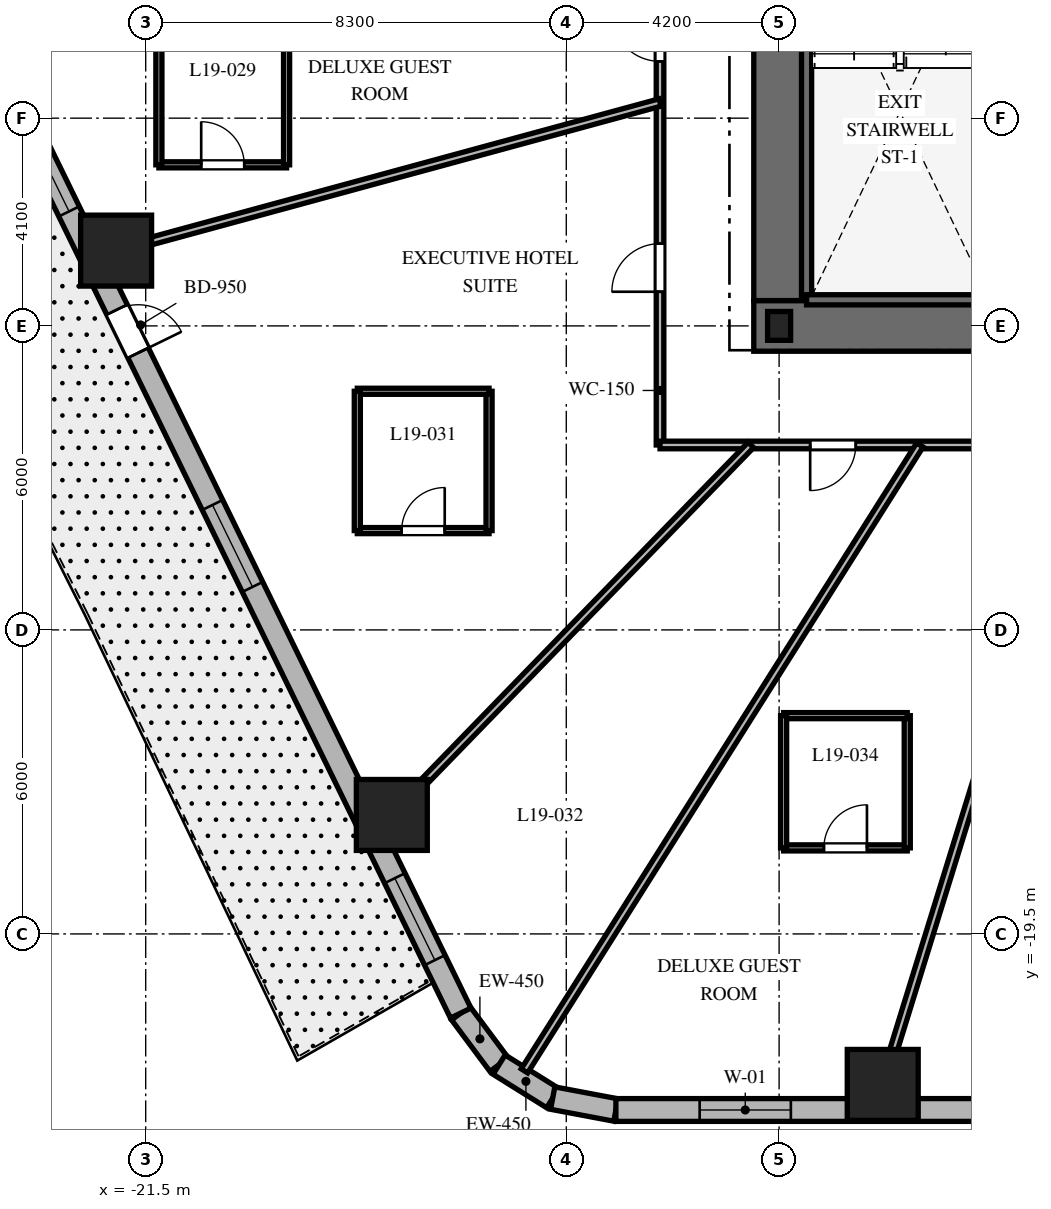
"""IFC4 building model, lengths in metres.
Left out: names, types, materials, properties, quantities, classifications, styles, units other than length and angle.
Written with IfcOpenShell. Run it as: python <this file> out.ifc"""

import sys

from ifc_helpers import new_model, si_unit, direction, frame, frame_2d, origin, origin_2d, place, context, subcontext, project, spatial, rectangle, i_section, extrude, element, fill, save


model = new_model("IFC4")
c1 = context("Model", 3, precision=1e-05, world=origin(), true_north=direction((0.0, 1.0)))
c2 = subcontext(c1, "Body", "Model", "MODEL_VIEW")
j1 = project(units=[si_unit("LENGTHUNIT", "METRE"), si_unit("PLANEANGLEUNIT", "RADIAN")], contexts=[c1])
p1 = place(None, origin())
s1 = spatial("IfcSite", under=j1, at=p1, CompositionType="ELEMENT")
p2 = place(p1, origin())
s2 = spatial("IfcBuilding", under=s1, at=p2, CompositionType="ELEMENT")
p3 = place(p2, frame((0.0, 0.0, 82.3)))
s3 = spatial("IfcBuildingStorey", under=s2, at=p3, CompositionType="ELEMENT", Elevation=82.3)
p4 = place(p3, frame((-9.5, -7.5, 0.0), z_axis=(0.0, 0.0, 1.0), x_axis=(1.0, 0.0, 0.0)))
e1 = element("IfcWall", 1, at=p4, inside=s3, PredefinedType="SHEAR", context=c2, shape_type="SweptSolid", body=[
    extrude(rectangle(XDim=19.0, YDim=1.0, at=frame_2d((9.5, 0.0))), origin(), (0.0, 0.0, 1.0), 3.7),
])
p5 = place(p4, frame((9.55, 0.0, 0.0)))
e2 = element("IfcOpeningElement", 2, at=p5, cuts=e1, PredefinedType="OPENING", context=c2, shape_type="SweptSolid", body=[
    extrude(rectangle(XDim=1.0, YDim=2.15, at=frame_2d((0.5, 1.075))), frame((0.0, 0.51, 0.0), z_axis=(0.0, -1.0, 0.0), x_axis=(1.0, 0.0, 0.0)), (0.0, 0.0, 1.0), 1.02),
])
p6 = place(p3, frame((-9.0, -7.0, 0.0), z_axis=(0.0, 0.0, 1.0), x_axis=(0.0, 1.0, 0.0)))
e3 = element("IfcWall", 3, at=p6, inside=s3, PredefinedType="SHEAR", context=c2, shape_type="SweptSolid", body=[
    extrude(rectangle(XDim=14.0, YDim=1.0, at=frame_2d((7.0, 0.0))), origin(), (0.0, 0.0, 1.0), 3.7),
])
p7 = place(p6, frame((10.125, 0.0, 0.0)))
e4 = element("IfcOpeningElement", 4, at=p7, cuts=e3, PredefinedType="OPENING", context=c2, shape_type="SweptSolid", body=[
    extrude(rectangle(XDim=1.05, YDim=2.15, at=frame_2d((0.525, 1.075))), frame((0.0, 0.51, 0.0), z_axis=(0.0, -1.0, 0.0), x_axis=(1.0, 0.0, 0.0)), (0.0, 0.0, 1.0), 1.02),
])
p8 = place(p3, frame((-8.458, -6.985, 0.0), z_axis=(0.0, 0.0, 1.0), x_axis=(0.0, 1.0, 0.0)))
e5 = element("IfcWall", 5, at=p8, inside=s3, PredefinedType="SHEAR", context=c2, shape_type="SweptSolid", body=[
    extrude(rectangle(XDim=9.143, YDim=0.2, at=frame_2d((4.572, 0.0))), origin(), (0.0, 0.0, 1.0), 3.7),
])
p9 = place(p3, frame((-8.458, -6.985, 0.0), z_axis=(0.0, 0.0, 1.0), x_axis=(1.0, 0.0, 0.0)))
e6 = element("IfcWall", 6, at=p9, inside=s3, PredefinedType="SHEAR", context=c2, shape_type="SweptSolid", body=[
    extrude(rectangle(XDim=3.686, YDim=0.2, at=frame_2d((1.843, 0.0))), origin(), (0.0, 0.0, 1.0), 3.7),
])
p10 = place(p3, frame((-9.0, -7.5, 0.0), z_axis=(0.0, 0.0, 1.0), x_axis=(1.0, 0.0, 0.0)))
e7 = element("IfcColumn", 7, at=p10, inside=s3, PredefinedType="COLUMN", context=c2, shape_type="SweptSolid", body=[
    extrude(i_section(OverallWidth=0.454, OverallDepth=0.569, WebThickness=0.078, FlangeThickness=0.125, at=origin_2d()), origin(), (0.0, 0.0, 1.0), 3.7),
])
for number, where, z_axis, x_axis in (
    (8, (-6.955, -22.48, 0.0), (0.0, 0.0, 1.0), (1.0, 0.0, 0.0)),
    (9, (-22.084, -6.014, 0.0), (0.0, 0.0, 1.0), (1.0, 0.0, 0.0)),
    (10, (-16.643, -17.152, 0.0), (0.0, 0.0, 1.0), (1.0, 0.0, 0.0)),
):
    element("IfcColumn", number, at=place(p3, frame(where, z_axis=z_axis, x_axis=x_axis)), inside=s3, PredefinedType="COLUMN", context=c2, shape_type="SweptSolid", body=[
        extrude(rectangle(XDim=1.4, YDim=1.4, at=origin_2d()), origin(), (0.0, 0.0, 1.0), 3.7),
    ])
p11 = place(p3, frame((-15.284, -21.062, 0.0), z_axis=(0.0, 0.0, 1.0), x_axis=(0.597595366449, -0.801797841104, 0.0)))
e11 = element("IfcWall", 11, at=p11, inside=s3, PredefinedType="SOLIDWALL", context=c2, shape_type="SweptSolid", body=[
    extrude(rectangle(XDim=1.269, YDim=0.45, at=frame_2d((0.634, 0.0))), origin(), (0.0, 0.0, 1.0), 3.38),
])
p12 = place(p3, frame((-14.526, -22.08, 0.0), z_axis=(0.0, 0.0, 1.0), x_axis=(0.848185203596, -0.529699783275, 0.0)))
e12 = element("IfcWall", 12, at=p12, inside=s3, PredefinedType="SOLIDWALL", context=c2, shape_type="SweptSolid", body=[
    extrude(rectangle(XDim=1.247, YDim=0.45, at=frame_2d((0.624, 0.0))), origin(), (0.0, 0.0, 1.0), 3.38),
])
p13 = place(p3, frame((-13.468, -22.74, 0.0), z_axis=(0.0, 0.0, 1.0), x_axis=(0.982717174228, -0.185113358451, 0.0)))
e13 = element("IfcWall", 13, at=p13, inside=s3, PredefinedType="SOLIDWALL", context=c2, shape_type="SweptSolid", body=[
    extrude(rectangle(XDim=1.269, YDim=0.45, at=frame_2d((0.634, 0.0))), origin(), (0.0, 0.0, 1.0), 3.38),
])
p14 = place(p3, frame((-12.221, -22.975, 0.0), z_axis=(0.0, 0.0, 1.0), x_axis=(1.0, 0.0, 0.0)))
e14 = element("IfcWall", 14, at=p14, inside=s3, PredefinedType="SOLIDWALL", context=c2, shape_type="SweptSolid", body=[
    extrude(rectangle(XDim=26.389, YDim=0.45, at=frame_2d((13.195, 0.0))), origin(), (0.0, 0.0, 1.0), 3.38),
])
p15 = place(p14, frame((1.653, 0.0, 0.8)))
e15 = element("IfcOpeningElement", 15, at=p15, cuts=e14, PredefinedType="OPENING", context=c2, shape_type="SweptSolid", body=[
    extrude(rectangle(XDim=1.8, YDim=1.8, at=frame_2d((0.9, 0.9))), frame((0.0, 0.235, 0.0), z_axis=(0.0, -1.0, 0.0), x_axis=(1.0, 0.0, 0.0)), (0.0, 0.0, 1.0), 0.47),
])
p16 = place(p14, frame((12.296, 0.0, 0.8)))
e16 = element("IfcOpeningElement", 16, at=p16, cuts=e14, PredefinedType="OPENING", context=c2, shape_type="SweptSolid", body=[
    extrude(rectangle(XDim=1.8, YDim=1.8, at=frame_2d((0.9, 0.9))), frame((0.0, 0.235, 0.0), z_axis=(0.0, -1.0, 0.0), x_axis=(1.0, 0.0, 0.0)), (0.0, 0.0, 1.0), 0.47),
])
p17 = place(p14, frame((22.938, 0.0, 0.8)))
e17 = element("IfcOpeningElement", 17, at=p17, cuts=e14, PredefinedType="OPENING", context=c2, shape_type="SweptSolid", body=[
    extrude(rectangle(XDim=1.8, YDim=1.8, at=frame_2d((0.9, 0.9))), frame((0.0, 0.235, 0.0), z_axis=(0.0, -1.0, 0.0), x_axis=(1.0, 0.0, 0.0)), (0.0, 0.0, 1.0), 0.47),
])
p18 = place(p3, frame((-24.336, -2.532, 0.0), z_axis=(0.0, 0.0, 1.0), x_axis=(0.438931326393, -0.898520612291, 0.0)))
e18 = element("IfcWall", 18, at=p18, inside=s3, PredefinedType="SOLIDWALL", context=c2, shape_type="SweptSolid", body=[
    extrude(rectangle(XDim=20.623, YDim=0.45, at=frame_2d((10.312, 0.0))), origin(), (0.0, 0.0, 1.0), 3.38),
])
p19 = place(p18, frame((5.171, 0.0, 0.0)))
e19 = element("IfcOpeningElement", 19, at=p19, cuts=e18, PredefinedType="OPENING", context=c2, shape_type="SweptSolid", body=[
    extrude(rectangle(XDim=0.95, YDim=2.15, at=frame_2d((0.475, 1.075))), frame((0.0, 0.235, 0.0), z_axis=(0.0, -1.0, 0.0), x_axis=(1.0, 0.0, 0.0)), (0.0, 0.0, 1.0), 0.47),
])
p20 = place(p18, frame((1.214, 0.0, 0.8)))
e20 = element("IfcOpeningElement", 20, at=p20, cuts=e18, PredefinedType="OPENING", context=c2, shape_type="SweptSolid", body=[
    extrude(rectangle(XDim=1.8, YDim=1.8, at=frame_2d((0.9, 0.9))), frame((0.0, 0.235, 0.0), z_axis=(0.0, -1.0, 0.0), x_axis=(1.0, 0.0, 0.0)), (0.0, 0.0, 1.0), 0.47),
])
p21 = place(p18, frame((9.462, 0.0, 0.8)))
e21 = element("IfcOpeningElement", 21, at=p21, cuts=e18, PredefinedType="OPENING", context=c2, shape_type="SweptSolid", body=[
    extrude(rectangle(XDim=1.8, YDim=1.8, at=frame_2d((0.9, 0.9))), frame((0.0, 0.235, 0.0), z_axis=(0.0, -1.0, 0.0), x_axis=(1.0, 0.0, 0.0)), (0.0, 0.0, 1.0), 0.47),
])
p22 = place(p18, frame((17.66, 0.0, 0.8)))
e22 = element("IfcOpeningElement", 22, at=p22, cuts=e18, PredefinedType="OPENING", context=c2, shape_type="SweptSolid", body=[
    extrude(rectangle(XDim=1.8, YDim=1.8, at=frame_2d((0.9, 0.9))), frame((0.0, 0.235, 0.0), z_axis=(0.0, -1.0, 0.0), x_axis=(1.0, 0.0, 0.0)), (0.0, 0.0, 1.0), 0.47),
])
p23 = place(p3, frame((-11.35, -9.85, 0.0), z_axis=(0.0, 0.0, 1.0), x_axis=(0.0, 1.0, 0.0)))
e23 = element("IfcWall", 23, at=p23, inside=s3, PredefinedType="PARTITIONING", context=c2, shape_type="SweptSolid", body=[
    extrude(rectangle(XDim=19.7, YDim=0.15, at=frame_2d((9.85, 0.0))), origin(), (0.0, 0.0, 1.0), 2.82),
])
p24 = place(p23, frame((17.206, 0.0, 0.0)))
e24 = element("IfcOpeningElement", 24, at=p24, cuts=e23, PredefinedType="OPENING", context=c2, shape_type="SweptSolid", body=[
    extrude(rectangle(XDim=0.9, YDim=2.03, at=frame_2d((0.45, 1.015))), frame((0.0, 0.085, 0.0), z_axis=(0.0, -1.0, 0.0), x_axis=(1.0, 0.0, 0.0)), (0.0, 0.0, 1.0), 0.17),
])
p25 = place(p23, frame((13.403, 0.0, 0.0)))
e25 = element("IfcOpeningElement", 25, at=p25, cuts=e23, PredefinedType="OPENING", context=c2, shape_type="SweptSolid", body=[
    extrude(rectangle(XDim=0.95, YDim=2.03, at=frame_2d((0.475, 1.015))), frame((0.0, 0.085, 0.0), z_axis=(0.0, -1.0, 0.0), x_axis=(1.0, 0.0, 0.0)), (0.0, 0.0, 1.0), 0.17),
])
p26 = place(p23, frame((10.134, 0.0, 0.0)))
e26 = element("IfcOpeningElement", 26, at=p26, cuts=e23, PredefinedType="OPENING", context=c2, shape_type="SweptSolid", body=[
    extrude(rectangle(XDim=0.95, YDim=2.03, at=frame_2d((0.475, 1.015))), frame((0.0, 0.085, 0.0), z_axis=(0.0, -1.0, 0.0), x_axis=(1.0, 0.0, 0.0)), (0.0, 0.0, 1.0), 0.17),
])
p27 = place(p23, frame((7.571, 0.0, 0.0)))
e27 = element("IfcOpeningElement", 27, at=p27, cuts=e23, PredefinedType="OPENING", context=c2, shape_type="SweptSolid", body=[
    extrude(rectangle(XDim=0.95, YDim=2.03, at=frame_2d((0.475, 1.015))), frame((0.0, 0.085, 0.0), z_axis=(0.0, -1.0, 0.0), x_axis=(1.0, 0.0, 0.0)), (0.0, 0.0, 1.0), 0.17),
])
p28 = place(p23, frame((3.024, 0.0, 0.0)))
e28 = element("IfcOpeningElement", 28, at=p28, cuts=e23, PredefinedType="OPENING", context=c2, shape_type="SweptSolid", body=[
    extrude(rectangle(XDim=0.95, YDim=2.03, at=frame_2d((0.475, 1.015))), frame((0.0, 0.085, 0.0), z_axis=(0.0, -1.0, 0.0), x_axis=(1.0, 0.0, 0.0)), (0.0, 0.0, 1.0), 0.17),
])
p29 = place(p3, frame((11.35, -9.85, 0.0), z_axis=(0.0, 0.0, 1.0), x_axis=(-1.0, 0.0, 0.0)))
e29 = element("IfcWall", 29, at=p29, inside=s3, PredefinedType="PARTITIONING", context=c2, shape_type="SweptSolid", body=[
    extrude(rectangle(XDim=22.7, YDim=0.15, at=frame_2d((11.35, 0.0))), origin(), (0.0, 0.0, 1.0), 2.82),
])
p30 = place(p29, frame((18.837, 0.0, 0.0)))
e30 = element("IfcOpeningElement", 30, at=p30, cuts=e29, PredefinedType="OPENING", context=c2, shape_type="SweptSolid", body=[
    extrude(rectangle(XDim=0.9, YDim=2.03, at=frame_2d((0.45, 1.015))), frame((0.0, 0.085, 0.0), z_axis=(0.0, -1.0, 0.0), x_axis=(1.0, 0.0, 0.0)), (0.0, 0.0, 1.0), 0.17),
])
p31 = place(p29, frame((15.532, 0.0, 0.0)))
e31 = element("IfcOpeningElement", 31, at=p31, cuts=e29, PredefinedType="OPENING", context=c2, shape_type="SweptSolid", body=[
    extrude(rectangle(XDim=0.95, YDim=2.03, at=frame_2d((0.475, 1.015))), frame((0.0, 0.085, 0.0), z_axis=(0.0, -1.0, 0.0), x_axis=(1.0, 0.0, 0.0)), (0.0, 0.0, 1.0), 0.17),
])
p32 = place(p29, frame((10.444, 0.0, 0.0)))
e32 = element("IfcOpeningElement", 32, at=p32, cuts=e29, PredefinedType="OPENING", context=c2, shape_type="SweptSolid", body=[
    extrude(rectangle(XDim=0.95, YDim=2.03, at=frame_2d((0.475, 1.015))), frame((0.0, 0.085, 0.0), z_axis=(0.0, -1.0, 0.0), x_axis=(1.0, 0.0, 0.0)), (0.0, 0.0, 1.0), 0.17),
])
p33 = place(p29, frame((3.369, 0.0, 0.0)))
e33 = element("IfcOpeningElement", 33, at=p33, cuts=e29, PredefinedType="OPENING", context=c2, shape_type="SweptSolid", body=[
    extrude(rectangle(XDim=0.95, YDim=2.03, at=frame_2d((0.475, 1.015))), frame((0.0, 0.085, 0.0), z_axis=(0.0, -1.0, 0.0), x_axis=(1.0, 0.0, 0.0)), (0.0, 0.0, 1.0), 0.17),
])
p34 = place(p3, frame((-11.35, -3.091, 0.0), z_axis=(0.0, 0.0, 1.0), x_axis=(-0.964859685283, -0.262765651704, 0.0)))
e34 = element("IfcWall", 34, at=p34, inside=s3, PredefinedType="PARTITIONING", context=c2, shape_type="SweptSolid", body=[
    extrude(rectangle(XDim=11.629, YDim=0.15, at=frame_2d((5.814, 0.0))), origin(), (0.0, 0.0, 1.0), 2.52),
])
p35 = place(p3, frame((-9.558, -9.85, 0.0), z_axis=(0.0, 0.0, 1.0), x_axis=(-0.69638346089, -0.717669893056, 0.0)))
e35 = element("IfcWall", 35, at=p35, inside=s3, PredefinedType="PARTITIONING", context=c2, shape_type="SweptSolid", body=[
    extrude(rectangle(XDim=10.701, YDim=0.15, at=frame_2d((5.351, 0.0))), origin(), (0.0, 0.0, 1.0), 2.52),
])
p36 = place(p3, frame((-6.222, -9.85, 0.0), z_axis=(0.0, 0.0, 1.0), x_axis=(-0.534069056435, -0.845440857162, 0.0)))
e36 = element("IfcWall", 36, at=p36, inside=s3, PredefinedType="PARTITIONING", context=c2, shape_type="SweptSolid", body=[
    extrude(rectangle(XDim=14.611, YDim=0.15, at=frame_2d((7.306, 0.0))), origin(), (0.0, 0.0, 1.0), 2.52),
])
p37 = place(p3, frame((-3.048, -9.85, 0.0), z_axis=(0.0, 0.0, 1.0), x_axis=(-0.295553992761, -0.955326037206, 0.0)))
e37 = element("IfcWall", 37, at=p37, inside=s3, PredefinedType="PARTITIONING", context=c2, shape_type="SweptSolid", body=[
    extrude(rectangle(XDim=13.739, YDim=0.15, at=frame_2d((6.869, 0.0))), origin(), (0.0, 0.0, 1.0), 2.52),
])
p38 = place(p3, frame((-21.24, -4.321, 0.0), z_axis=(0.0, 0.0, 1.0), x_axis=(1.0, 0.0, 0.0)))
e38 = element("IfcWall", 38, at=p38, inside=s3, PredefinedType="PARTITIONING", context=c2, shape_type="SweptSolid", body=[
    extrude(rectangle(XDim=2.52, YDim=0.12, at=frame_2d((1.26, 0.0))), origin(), (0.0, 0.0, 1.0), 3.38),
])
p39 = place(p38, frame((0.835, 0.0, 0.0)))
e39 = element("IfcOpeningElement", 39, at=p39, cuts=e38, PredefinedType="OPENING", context=c2, shape_type="SweptSolid", body=[
    extrude(rectangle(XDim=0.85, YDim=2.03, at=frame_2d((0.425, 1.015))), frame((0.0, 0.07, 0.0), z_axis=(0.0, -1.0, 0.0), x_axis=(1.0, 0.0, 0.0)), (0.0, 0.0, 1.0), 0.14),
])
for number, where, z_axis, x_axis in (
    (40, (-18.72, -4.321, 0.0), (0.0, 0.0, 1.0), (0.0, 1.0, 0.0)),
    (41, (-21.24, -1.641, 0.0), (0.0, 0.0, 1.0), (0.0, -1.0, 0.0)),
):
    element("IfcWall", number, at=place(p3, frame(where, z_axis=z_axis, x_axis=x_axis)), inside=s3, PredefinedType="PARTITIONING", context=c2, shape_type="SweptSolid", body=[
        extrude(rectangle(XDim=2.68, YDim=0.12, at=frame_2d((1.34, 0.0))), origin(), (0.0, 0.0, 1.0), 3.38),
    ])
p40 = place(p3, frame((-17.324, -11.54, 0.0), z_axis=(0.0, 0.0, 1.0), x_axis=(1.0, 0.0, 0.0)))
e42 = element("IfcWall", 42, at=p40, inside=s3, PredefinedType="PARTITIONING", context=c2, shape_type="SweptSolid", body=[
    extrude(rectangle(XDim=2.6, YDim=0.12, at=frame_2d((1.3, 0.0))), origin(), (0.0, 0.0, 1.0), 2.906),
])
p41 = place(p40, frame((0.875, 0.0, 0.0)))
e43 = element("IfcOpeningElement", 43, at=p41, cuts=e42, PredefinedType="OPENING", context=c2, shape_type="SweptSolid", body=[
    extrude(rectangle(XDim=0.85, YDim=2.03, at=frame_2d((0.425, 1.015))), frame((0.0, 0.07, 0.0), z_axis=(0.0, -1.0, 0.0), x_axis=(1.0, 0.0, 0.0)), (0.0, 0.0, 1.0), 0.14),
])
p42 = place(p3, frame((-14.724, -11.54, 0.0), z_axis=(0.0, 0.0, 1.0), x_axis=(0.0, 1.0, 0.0)))
e44 = element("IfcWall", 44, at=p42, inside=s3, PredefinedType="PARTITIONING", context=c2, shape_type="SweptSolid", body=[
    extrude(rectangle(XDim=2.75, YDim=0.12, at=frame_2d((1.375, 0.0))), origin(), (0.0, 0.0, 1.0), 3.38),
])
p43 = place(p3, frame((-14.724, -8.79, 0.0), z_axis=(0.0, 0.0, 1.0), x_axis=(-1.0, 0.0, 0.0)))
e45 = element("IfcWall", 45, at=p43, inside=s3, PredefinedType="PARTITIONING", context=c2, shape_type="SweptSolid", body=[
    extrude(rectangle(XDim=2.6, YDim=0.12, at=frame_2d((1.3, 0.0))), origin(), (0.0, 0.0, 1.0), 2.906),
])
p44 = place(p3, frame((-17.324, -8.79, 0.0), z_axis=(0.0, 0.0, 1.0), x_axis=(0.0, -1.0, 0.0)))
e46 = element("IfcWall", 46, at=p44, inside=s3, PredefinedType="PARTITIONING", context=c2, shape_type="SweptSolid", body=[
    extrude(rectangle(XDim=2.75, YDim=0.12, at=frame_2d((1.375, 0.0))), origin(), (0.0, 0.0, 1.0), 3.38),
])
p45 = place(p3, frame((-8.911, -17.802, 0.0), z_axis=(0.0, 0.0, 1.0), x_axis=(1.0, 0.0, 0.0)))
e47 = element("IfcWall", 47, at=p45, inside=s3, PredefinedType="PARTITIONING", context=c2, shape_type="SweptSolid", body=[
    extrude(rectangle(XDim=2.44, YDim=0.12, at=frame_2d((1.22, 0.0))), origin(), (0.0, 0.0, 1.0), 2.82),
])
p46 = place(p45, frame((0.795, 0.0, 0.0)))
e48 = element("IfcOpeningElement", 48, at=p46, cuts=e47, PredefinedType="OPENING", context=c2, shape_type="SweptSolid", body=[
    extrude(rectangle(XDim=0.85, YDim=2.03, at=frame_2d((0.425, 1.015))), frame((0.0, 0.07, 0.0), z_axis=(0.0, -1.0, 0.0), x_axis=(1.0, 0.0, 0.0)), (0.0, 0.0, 1.0), 0.14),
])
p47 = place(p3, frame((-6.471, -17.802, 0.0), z_axis=(0.0, 0.0, 1.0), x_axis=(0.0, 1.0, 0.0)))
e49 = element("IfcWall", 49, at=p47, inside=s3, PredefinedType="PARTITIONING", context=c2, shape_type="SweptSolid", body=[
    extrude(rectangle(XDim=2.61, YDim=0.12, at=frame_2d((1.305, 0.0))), origin(), (0.0, 0.0, 1.0), 2.82),
])
p48 = place(p3, frame((-6.471, -15.192, 0.0), z_axis=(0.0, 0.0, 1.0), x_axis=(-1.0, 0.0, 0.0)))
e50 = element("IfcWall", 50, at=p48, inside=s3, PredefinedType="PARTITIONING", context=c2, shape_type="SweptSolid", body=[
    extrude(rectangle(XDim=2.44, YDim=0.12, at=frame_2d((1.22, 0.0))), origin(), (0.0, 0.0, 1.0), 2.82),
])
p49 = place(p3, frame((-8.911, -15.192, 0.0), z_axis=(0.0, 0.0, 1.0), x_axis=(0.0, -1.0, 0.0)))
e51 = element("IfcWall", 51, at=p49, inside=s3, PredefinedType="PARTITIONING", context=c2, shape_type="SweptSolid", body=[
    extrude(rectangle(XDim=2.61, YDim=0.12, at=frame_2d((1.305, 0.0))), origin(), (0.0, 0.0, 1.0), 2.952),
])
p50 = place(p15, origin())
e52 = element("IfcWindow", 52, at=p50, inside=s3, PartitioningType="SINGLE_PANEL", PredefinedType="WINDOW", context=c2, shape_type="SweptSolid", body=[
    extrude(rectangle(XDim=1.8, YDim=1.8, at=frame_2d((0.9, 0.9))), frame((0.0, 0.03, 0.0), z_axis=(0.0, -1.0, 0.0), x_axis=(1.0, 0.0, 0.0)), (0.0, 0.0, 1.0), 0.06),
])
fill(e15, e52)
p51 = place(p19, origin())
e53 = element("IfcDoor", 53, at=p51, inside=s3, OperationType="SINGLE_SWING_RIGHT", PredefinedType="DOOR", context=c2, shape_type="SweptSolid", body=[
    extrude(rectangle(XDim=0.95, YDim=2.15, at=frame_2d((0.475, 1.075))), frame((0.0, 0.025, 0.0), z_axis=(0.0, -1.0, 0.0), x_axis=(1.0, 0.0, 0.0)), (0.0, 0.0, 1.0), 0.05),
])
fill(e19, e53)
p52 = place(p20, origin())
e54 = element("IfcWindow", 54, at=p52, inside=s3, PartitioningType="SINGLE_PANEL", PredefinedType="WINDOW", context=c2, shape_type="SweptSolid", body=[
    extrude(rectangle(XDim=1.8, YDim=1.8, at=frame_2d((0.9, 0.9))), frame((0.0, 0.03, 0.0), z_axis=(0.0, -1.0, 0.0), x_axis=(1.0, 0.0, 0.0)), (0.0, 0.0, 1.0), 0.06),
])
fill(e20, e54)
p53 = place(p21, origin())
e55 = element("IfcWindow", 55, at=p53, inside=s3, PartitioningType="SINGLE_PANEL", PredefinedType="WINDOW", context=c2, shape_type="SweptSolid", body=[
    extrude(rectangle(XDim=1.8, YDim=1.8, at=frame_2d((0.9, 0.9))), frame((0.0, 0.03, 0.0), z_axis=(0.0, -1.0, 0.0), x_axis=(1.0, 0.0, 0.0)), (0.0, 0.0, 1.0), 0.06),
])
fill(e21, e55)
p54 = place(p22, origin())
e56 = element("IfcWindow", 56, at=p54, inside=s3, PartitioningType="SINGLE_PANEL", PredefinedType="WINDOW", context=c2, shape_type="SweptSolid", body=[
    extrude(rectangle(XDim=1.8, YDim=1.8, at=frame_2d((0.9, 0.9))), frame((0.0, 0.03, 0.0), z_axis=(0.0, -1.0, 0.0), x_axis=(1.0, 0.0, 0.0)), (0.0, 0.0, 1.0), 0.06),
])
fill(e22, e56)
p55 = place(p27, origin())
e57 = element("IfcDoor", 57, at=p55, inside=s3, OperationType="SINGLE_SWING_RIGHT", PredefinedType="DOOR", context=c2, shape_type="SweptSolid", body=[
    extrude(rectangle(XDim=0.95, YDim=2.03, at=frame_2d((0.475, 1.015))), frame((0.0, 0.025, 0.0), z_axis=(0.0, -1.0, 0.0), x_axis=(1.0, 0.0, 0.0)), (0.0, 0.0, 1.0), 0.05),
])
fill(e27, e57)
p56 = place(p39, origin())
e58 = element("IfcDoor", 58, at=p56, inside=s3, OperationType="SINGLE_SWING_LEFT", PredefinedType="DOOR", context=c2, shape_type="SweptSolid", body=[
    extrude(rectangle(XDim=0.85, YDim=2.03, at=frame_2d((0.425, 1.015))), frame((0.0, 0.025, 0.0), z_axis=(0.0, -1.0, 0.0), x_axis=(1.0, 0.0, 0.0)), (0.0, 0.0, 1.0), 0.05),
])
fill(e39, e58)
p57 = place(p28, origin())
e59 = element("IfcDoor", 59, at=p57, inside=s3, OperationType="SINGLE_SWING_LEFT", PredefinedType="DOOR", context=c2, shape_type="SweptSolid", body=[
    extrude(rectangle(XDim=0.95, YDim=2.03, at=frame_2d((0.475, 1.015))), frame((0.0, 0.025, 0.0), z_axis=(0.0, -1.0, 0.0), x_axis=(1.0, 0.0, 0.0)), (0.0, 0.0, 1.0), 0.05),
])
fill(e28, e59)
p58 = place(p41, origin())
e60 = element("IfcDoor", 60, at=p58, inside=s3, OperationType="SINGLE_SWING_RIGHT", PredefinedType="DOOR", context=c2, shape_type="SweptSolid", body=[
    extrude(rectangle(XDim=0.85, YDim=2.03, at=frame_2d((0.425, 1.015))), frame((0.0, 0.025, 0.0), z_axis=(0.0, -1.0, 0.0), x_axis=(1.0, 0.0, 0.0)), (0.0, 0.0, 1.0), 0.05),
])
fill(e43, e60)
p59 = place(p30, origin())
e61 = element("IfcDoor", 61, at=p59, inside=s3, OperationType="SINGLE_SWING_RIGHT", PredefinedType="DOOR", context=c2, shape_type="SweptSolid", body=[
    extrude(rectangle(XDim=0.9, YDim=2.03, at=frame_2d((0.45, 1.015))), frame((0.0, 0.025, 0.0), z_axis=(0.0, -1.0, 0.0), x_axis=(1.0, 0.0, 0.0)), (0.0, 0.0, 1.0), 0.05),
])
fill(e30, e61)
p60 = place(p46, origin())
e62 = element("IfcDoor", 62, at=p60, inside=s3, OperationType="SINGLE_SWING_RIGHT", PredefinedType="DOOR", context=c2, shape_type="SweptSolid", body=[
    extrude(rectangle(XDim=0.85, YDim=2.03, at=frame_2d((0.425, 1.015))), frame((0.0, 0.025, 0.0), z_axis=(0.0, -1.0, 0.0), x_axis=(1.0, 0.0, 0.0)), (0.0, 0.0, 1.0), 0.05),
])
fill(e48, e62)
save(model, sys.argv[1])
